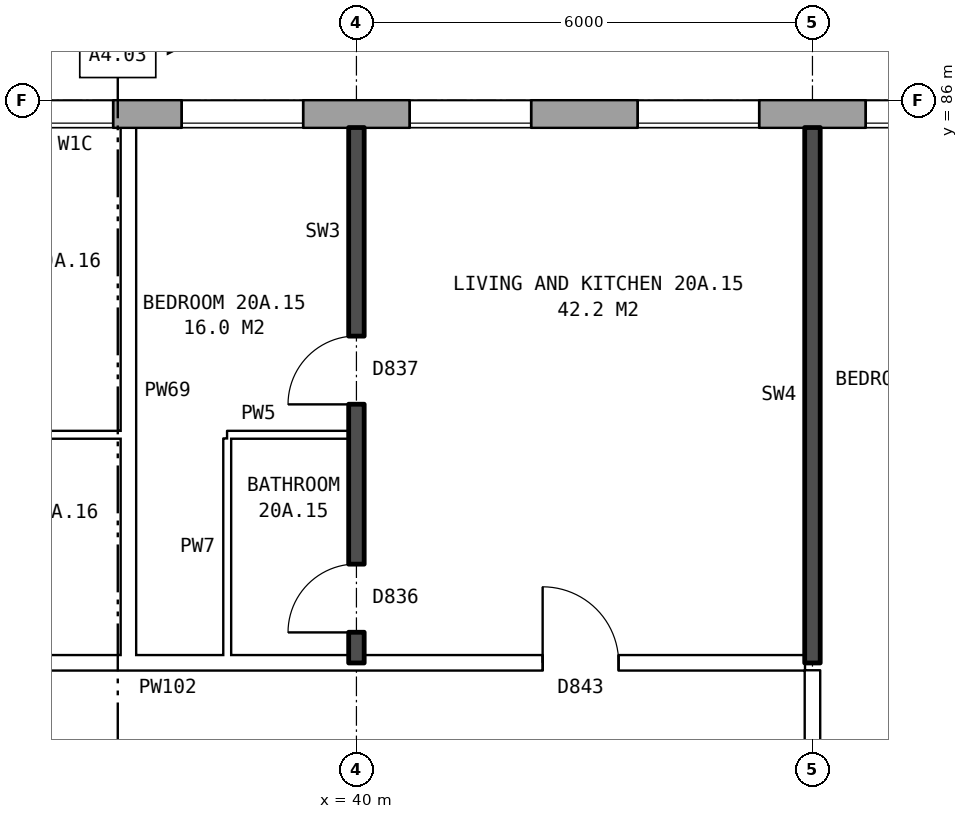
"""IFC4 building model, lengths in metres.
Left out: names, types, materials, properties, quantities, classifications, styles, units other than length and angle.
Written with IfcOpenShell. Run it as: python <this file> out.ifc"""

import sys

from ifc_helpers import new_model, si_unit, direction, frame, frame_2d, origin, place, context, subcontext, project, spatial, rectangle, extrude, element, fill, save


model = new_model("IFC4")
c1 = context("Model", 3, precision=1e-05, world=origin(), true_north=direction((0.0, 1.0)))
c2 = subcontext(c1, "Body", "Model", "MODEL_VIEW")
j1 = project(units=[si_unit("LENGTHUNIT", "METRE"), si_unit("PLANEANGLEUNIT", "RADIAN")], contexts=[c1])
p1 = place(None, origin())
s1 = spatial("IfcSite", under=j1, at=p1, CompositionType="ELEMENT")
p2 = place(p1, origin())
s2 = spatial("IfcBuilding", under=s1, at=p2, CompositionType="ELEMENT")
p3 = place(p2, frame((0.0, 0.0, 74.7)))
s3 = spatial("IfcBuildingStorey", under=s2, at=p3, CompositionType="ELEMENT", Elevation=74.7)
p4 = place(p3, frame((72.925, 85.82, 0.0), z_axis=(0.0, 0.0, 1.0), x_axis=(-1.0, 0.0, 0.0)))
e1 = element("IfcWall", 1, at=p4, inside=s3, PredefinedType="STANDARD", context=c2, shape_type="SweptSolid", body=[
    extrude(rectangle(XDim=46.601, YDim=0.36, at=frame_2d((23.3, 0.0))), origin(), (0.0, 0.0, 1.0), 2.85),
])
p5 = place(p4, frame((0.625, 0.0, 0.8)))
e2 = element("IfcOpeningElement", 2, at=p5, cuts=e1, PredefinedType="OPENING", context=c2, shape_type="SweptSolid", body=[
    extrude(rectangle(XDim=1.6, YDim=1.8, at=frame_2d((0.8, 0.9))), frame((0.0, 0.19, 0.0), z_axis=(0.0, -1.0, 0.0), x_axis=(1.0, 0.0, 0.0)), (0.0, 0.0, 1.0), 0.38),
])
p6 = place(p4, frame((3.625, 0.0, 0.8)))
e3 = element("IfcOpeningElement", 3, at=p6, cuts=e1, PredefinedType="OPENING", context=c2, shape_type="SweptSolid", body=[
    extrude(rectangle(XDim=1.6, YDim=1.8, at=frame_2d((0.8, 0.9))), frame((0.0, 0.19, 0.0), z_axis=(0.0, -1.0, 0.0), x_axis=(1.0, 0.0, 0.0)), (0.0, 0.0, 1.0), 0.38),
])
p7 = place(p4, frame((5.525, 0.0, 1.7)))
e4 = element("IfcOpeningElement", 4, at=p7, cuts=e1, PredefinedType="OPENING", context=c2, shape_type="SweptSolid", body=[
    extrude(rectangle(XDim=1.4, YDim=0.9, at=frame_2d((0.7, 0.45))), frame((0.0, 0.19, 0.0), z_axis=(0.0, -1.0, 0.0), x_axis=(1.0, 0.0, 0.0)), (0.0, 0.0, 1.0), 0.38),
])
p8 = place(p4, frame((9.625, 0.0, 0.8)))
e5 = element("IfcOpeningElement", 5, at=p8, cuts=e1, PredefinedType="OPENING", context=c2, shape_type="SweptSolid", body=[
    extrude(rectangle(XDim=1.6, YDim=1.8, at=frame_2d((0.8, 0.9))), frame((0.0, 0.19, 0.0), z_axis=(0.0, -1.0, 0.0), x_axis=(1.0, 0.0, 0.0)), (0.0, 0.0, 1.0), 0.38),
])
p9 = place(p4, frame((12.625, 0.0, 0.8)))
e6 = element("IfcOpeningElement", 6, at=p9, cuts=e1, PredefinedType="OPENING", context=c2, shape_type="SweptSolid", body=[
    extrude(rectangle(XDim=1.6, YDim=1.8, at=frame_2d((0.8, 0.9))), frame((0.0, 0.19, 0.0), z_axis=(0.0, -1.0, 0.0), x_axis=(1.0, 0.0, 0.0)), (0.0, 0.0, 1.0), 0.38),
])
p10 = place(p4, frame((15.625, 0.0, 0.8)))
e7 = element("IfcOpeningElement", 7, at=p10, cuts=e1, PredefinedType="OPENING", context=c2, shape_type="SweptSolid", body=[
    extrude(rectangle(XDim=1.6, YDim=1.8, at=frame_2d((0.8, 0.9))), frame((0.0, 0.19, 0.0), z_axis=(0.0, -1.0, 0.0), x_axis=(1.0, 0.0, 0.0)), (0.0, 0.0, 1.0), 0.38),
])
p11 = place(p4, frame((18.625, 0.0, 0.8)))
e8 = element("IfcOpeningElement", 8, at=p11, cuts=e1, PredefinedType="OPENING", context=c2, shape_type="SweptSolid", body=[
    extrude(rectangle(XDim=1.6, YDim=1.8, at=frame_2d((0.8, 0.9))), frame((0.0, 0.19, 0.0), z_axis=(0.0, -1.0, 0.0), x_axis=(1.0, 0.0, 0.0)), (0.0, 0.0, 1.0), 0.38),
])
p12 = place(p4, frame((21.625, 0.0, 0.8)))
e9 = element("IfcOpeningElement", 9, at=p12, cuts=e1, PredefinedType="OPENING", context=c2, shape_type="SweptSolid", body=[
    extrude(rectangle(XDim=1.6, YDim=1.8, at=frame_2d((0.8, 0.9))), frame((0.0, 0.19, 0.0), z_axis=(0.0, -1.0, 0.0), x_axis=(1.0, 0.0, 0.0)), (0.0, 0.0, 1.0), 0.38),
])
p13 = place(p4, frame((24.625, 0.0, 0.8)))
e10 = element("IfcOpeningElement", 10, at=p13, cuts=e1, PredefinedType="OPENING", context=c2, shape_type="SweptSolid", body=[
    extrude(rectangle(XDim=1.6, YDim=1.8, at=frame_2d((0.8, 0.9))), frame((0.0, 0.19, 0.0), z_axis=(0.0, -1.0, 0.0), x_axis=(1.0, 0.0, 0.0)), (0.0, 0.0, 1.0), 0.38),
])
p14 = place(p4, frame((27.625, 0.0, 0.8)))
e11 = element("IfcOpeningElement", 11, at=p14, cuts=e1, PredefinedType="OPENING", context=c2, shape_type="SweptSolid", body=[
    extrude(rectangle(XDim=1.6, YDim=1.8, at=frame_2d((0.8, 0.9))), frame((0.0, 0.19, 0.0), z_axis=(0.0, -1.0, 0.0), x_axis=(1.0, 0.0, 0.0)), (0.0, 0.0, 1.0), 0.38),
])
p15 = place(p4, frame((30.625, 0.0, 0.8)))
e12 = element("IfcOpeningElement", 12, at=p15, cuts=e1, PredefinedType="OPENING", context=c2, shape_type="SweptSolid", body=[
    extrude(rectangle(XDim=1.6, YDim=1.8, at=frame_2d((0.8, 0.9))), frame((0.0, 0.19, 0.0), z_axis=(0.0, -1.0, 0.0), x_axis=(1.0, 0.0, 0.0)), (0.0, 0.0, 1.0), 0.38),
])
p16 = place(p4, frame((33.625, 0.0, 0.8)))
e13 = element("IfcOpeningElement", 13, at=p16, cuts=e1, PredefinedType="OPENING", context=c2, shape_type="SweptSolid", body=[
    extrude(rectangle(XDim=1.6, YDim=1.8, at=frame_2d((0.8, 0.9))), frame((0.0, 0.19, 0.0), z_axis=(0.0, -1.0, 0.0), x_axis=(1.0, 0.0, 0.0)), (0.0, 0.0, 1.0), 0.38),
])
p17 = place(p4, frame((36.125, 0.0, 0.8)))
e14 = element("IfcOpeningElement", 14, at=p17, cuts=e1, PredefinedType="OPENING", context=c2, shape_type="SweptSolid", body=[
    extrude(rectangle(XDim=1.0, YDim=1.8, at=frame_2d((0.5, 0.9))), frame((0.0, 0.19, 0.0), z_axis=(0.0, -1.0, 0.0), x_axis=(1.0, 0.0, 0.0)), (0.0, 0.0, 1.0), 0.38),
])
p18 = place(p4, frame((39.625, 0.0, 1.7)))
e15 = element("IfcOpeningElement", 15, at=p18, cuts=e1, PredefinedType="OPENING", context=c2, shape_type="SweptSolid", body=[
    extrude(rectangle(XDim=0.8, YDim=0.9, at=frame_2d((0.4, 0.45))), frame((0.0, 0.19, 0.0), z_axis=(0.0, -1.0, 0.0), x_axis=(1.0, 0.0, 0.0)), (0.0, 0.0, 1.0), 0.38),
])
p19 = place(p4, frame((42.625, 0.0, 0.8)))
e16 = element("IfcOpeningElement", 16, at=p19, cuts=e1, PredefinedType="OPENING", context=c2, shape_type="SweptSolid", body=[
    extrude(rectangle(XDim=1.6, YDim=1.8, at=frame_2d((0.8, 0.9))), frame((0.0, 0.19, 0.0), z_axis=(0.0, -1.0, 0.0), x_axis=(1.0, 0.0, 0.0)), (0.0, 0.0, 1.0), 0.38),
])
p20 = place(p4, frame((37.425, 0.0, 0.8)))
e17 = element("IfcOpeningElement", 17, at=p20, cuts=e1, PredefinedType="OPENING", context=c2, shape_type="SweptSolid", body=[
    extrude(rectangle(XDim=0.8, YDim=0.9, at=frame_2d((0.4, 0.45))), frame((0.0, 0.19, 0.0), z_axis=(0.0, -1.0, 0.0), x_axis=(1.0, 0.0, 0.0)), (0.0, 0.0, 1.0), 0.38),
])
p21 = place(p4, frame((40.725, 0.0, 0.8)))
e18 = element("IfcOpeningElement", 18, at=p21, cuts=e1, PredefinedType="OPENING", context=c2, shape_type="SweptSolid", body=[
    extrude(rectangle(XDim=1.6, YDim=1.8, at=frame_2d((0.8, 0.9))), frame((0.0, 0.19, 0.0), z_axis=(0.0, -1.0, 0.0), x_axis=(1.0, 0.0, 0.0)), (0.0, 0.0, 1.0), 0.38),
])
p22 = place(p3, frame((23.61, 78.6, 0.0), z_axis=(0.0, 0.0, 1.0), x_axis=(1.0, 0.0, 0.0)))
e19 = element("IfcWall", 19, at=p22, inside=s3, PredefinedType="PARTITIONING", context=c2, shape_type="SweptSolid", body=[
    extrude(rectangle(XDim=22.29, YDim=0.2, at=frame_2d((11.145, 0.0))), origin(), (0.0, 0.0, 1.0), 2.85),
])
p23 = place(p22, frame((18.84, 0.0, 0.0)))
e20 = element("IfcOpeningElement", 20, at=p23, cuts=e19, PredefinedType="OPENING", context=c2, shape_type="SweptSolid", body=[
    extrude(rectangle(XDim=1.0, YDim=2.1, at=frame_2d((0.5, 1.05))), frame((0.0, 0.11, 0.0), z_axis=(0.0, -1.0, 0.0), x_axis=(1.0, 0.0, 0.0)), (0.0, 0.0, 1.0), 0.22),
])
p24 = place(p22, frame((6.89, 0.0, 0.0)))
e21 = element("IfcOpeningElement", 21, at=p24, cuts=e19, PredefinedType="OPENING", context=c2, shape_type="SweptSolid", body=[
    extrude(rectangle(XDim=1.0, YDim=2.1, at=frame_2d((0.5, 1.05))), frame((0.0, 0.11, 0.0), z_axis=(0.0, -1.0, 0.0), x_axis=(1.0, 0.0, 0.0)), (0.0, 0.0, 1.0), 0.22),
])
p25 = place(p3, frame((34.1, 81.6, 0.0), z_axis=(0.0, 0.0, 1.0), x_axis=(1.0, 0.0, 0.0)))
e22 = element("IfcWall", 22, at=p25, inside=s3, PredefinedType="PARTITIONING", context=c2, shape_type="SweptSolid", body=[
    extrude(rectangle(XDim=2.8, YDim=0.1, at=frame_2d((1.4, 0.0))), origin(), (0.0, 0.0, 1.0), 2.85),
])
p26 = place(p3, frame((38.3, 81.6, 0.0), z_axis=(0.0, 0.0, 1.0), x_axis=(1.0, 0.0, 0.0)))
e23 = element("IfcWall", 23, at=p26, inside=s3, PredefinedType="PARTITIONING", context=c2, shape_type="SweptSolid", body=[
    extrude(rectangle(XDim=1.6, YDim=0.1, at=frame_2d((0.8, 0.0))), origin(), (0.0, 0.0, 1.0), 2.85),
])
p27 = place(p3, frame((37.0, 78.7, 0.0), z_axis=(0.0, 0.0, 1.0), x_axis=(0.0, 1.0, 0.0)))
e24 = element("IfcWall", 24, at=p27, inside=s3, PredefinedType="PARTITIONING", context=c2, shape_type="SweptSolid", body=[
    extrude(rectangle(XDim=6.94, YDim=0.2, at=frame_2d((3.47, 0.0))), origin(), (0.0, 0.0, 1.0), 2.85),
])
p28 = place(p3, frame((38.3, 78.7, 0.0), z_axis=(0.0, 0.0, 1.0), x_axis=(0.0, 1.0, 0.0)))
e25 = element("IfcWall", 25, at=p28, inside=s3, PredefinedType="PARTITIONING", context=c2, shape_type="SweptSolid", body=[
    extrude(rectangle(XDim=2.85, YDim=0.1, at=frame_2d((1.425, 0.0))), origin(), (0.0, 0.0, 1.0), 2.85),
])
p29 = place(p3, frame((40.0, 78.6, 0.0), z_axis=(0.0, 0.0, 1.0), x_axis=(0.0, 1.0, 0.0)))
e26 = element("IfcWall", 26, at=p29, inside=s3, PredefinedType="SOLIDWALL", context=c2, shape_type="SweptSolid", body=[
    extrude(rectangle(XDim=7.04, YDim=0.2, at=frame_2d((3.52, 0.0))), origin(), (0.0, 0.0, 1.0), 2.85),
])
p30 = place(p29, frame((3.4, 0.0, 0.0)))
e27 = element("IfcOpeningElement", 27, at=p30, cuts=e26, PredefinedType="OPENING", context=c2, shape_type="SweptSolid", body=[
    extrude(rectangle(XDim=0.9, YDim=2.1, at=frame_2d((0.45, 1.05))), frame((0.0, 0.11, 0.0), z_axis=(0.0, -1.0, 0.0), x_axis=(1.0, 0.0, 0.0)), (0.0, 0.0, 1.0), 0.22),
])
p31 = place(p29, frame((0.4, 0.0, 0.0)))
e28 = element("IfcOpeningElement", 28, at=p31, cuts=e26, PredefinedType="OPENING", context=c2, shape_type="SweptSolid", body=[
    extrude(rectangle(XDim=0.9, YDim=2.1, at=frame_2d((0.45, 1.05))), frame((0.0, 0.11, 0.0), z_axis=(0.0, -1.0, 0.0), x_axis=(1.0, 0.0, 0.0)), (0.0, 0.0, 1.0), 0.22),
])
p32 = place(p3, frame((46.0, 76.3, 0.0), z_axis=(0.0, 0.0, 1.0), x_axis=(0.0, 1.0, 0.0)))
e29 = element("IfcWall", 29, at=p32, inside=s3, PredefinedType="PARTITIONING", context=c2, shape_type="SweptSolid", body=[
    extrude(rectangle(XDim=2.2, YDim=0.2, at=frame_2d((1.1, 0.0))), origin(), (0.0, 0.0, 1.0), 2.85),
])
p33 = place(p3, frame((46.0, 78.6, 0.0), z_axis=(0.0, 0.0, 1.0), x_axis=(0.0, 1.0, 0.0)))
e30 = element("IfcWall", 30, at=p33, inside=s3, PredefinedType="SOLIDWALL", context=c2, shape_type="SweptSolid", body=[
    extrude(rectangle(XDim=7.04, YDim=0.2, at=frame_2d((3.52, 0.0))), origin(), (0.0, 0.0, 1.0), 2.85),
])
p34 = place(p13, origin())
e31 = element("IfcWindow", 31, at=p34, inside=s3, PartitioningType="SINGLE_PANEL", PredefinedType="WINDOW", context=c2, shape_type="SweptSolid", body=[
    extrude(rectangle(XDim=1.6, YDim=1.8, at=frame_2d((0.8, 0.9))), frame((0.0, 0.15, 0.0), z_axis=(0.0, -1.0, 0.0), x_axis=(1.0, 0.0, 0.0)), (0.0, 0.0, 1.0), 0.06),
])
fill(e10, e31)
p35 = place(p14, origin())
e32 = element("IfcWindow", 32, at=p35, inside=s3, PartitioningType="SINGLE_PANEL", PredefinedType="WINDOW", context=c2, shape_type="SweptSolid", body=[
    extrude(rectangle(XDim=1.6, YDim=1.8, at=frame_2d((0.8, 0.9))), frame((0.0, 0.15, 0.0), z_axis=(0.0, -1.0, 0.0), x_axis=(1.0, 0.0, 0.0)), (0.0, 0.0, 1.0), 0.06),
])
fill(e11, e32)
p36 = place(p15, origin())
e33 = element("IfcWindow", 33, at=p36, inside=s3, PartitioningType="SINGLE_PANEL", PredefinedType="WINDOW", context=c2, shape_type="SweptSolid", body=[
    extrude(rectangle(XDim=1.6, YDim=1.8, at=frame_2d((0.8, 0.9))), frame((0.0, 0.15, 0.0), z_axis=(0.0, -1.0, 0.0), x_axis=(1.0, 0.0, 0.0)), (0.0, 0.0, 1.0), 0.06),
])
fill(e12, e33)
p37 = place(p16, origin())
e34 = element("IfcWindow", 34, at=p37, inside=s3, PartitioningType="SINGLE_PANEL", PredefinedType="WINDOW", context=c2, shape_type="SweptSolid", body=[
    extrude(rectangle(XDim=1.6, YDim=1.8, at=frame_2d((0.8, 0.9))), frame((0.0, 0.15, 0.0), z_axis=(0.0, -1.0, 0.0), x_axis=(1.0, 0.0, 0.0)), (0.0, 0.0, 1.0), 0.06),
])
fill(e13, e34)
p38 = place(p17, origin())
e35 = element("IfcWindow", 35, at=p38, inside=s3, PartitioningType="SINGLE_PANEL", PredefinedType="WINDOW", context=c2, shape_type="SweptSolid", body=[
    extrude(rectangle(XDim=1.0, YDim=1.8, at=frame_2d((0.5, 0.9))), frame((0.0, 0.15, 0.0), z_axis=(0.0, -1.0, 0.0), x_axis=(1.0, 0.0, 0.0)), (0.0, 0.0, 1.0), 0.06),
])
fill(e14, e35)
p39 = place(p30, origin())
e36 = element("IfcDoor", 36, at=p39, inside=s3, OperationType="SINGLE_SWING_LEFT", PredefinedType="DOOR", context=c2, shape_type="SweptSolid", body=[
    extrude(rectangle(XDim=0.9, YDim=2.1, at=frame_2d((0.45, 1.05))), frame((0.0, 0.025, 0.0), z_axis=(0.0, -1.0, 0.0), x_axis=(1.0, 0.0, 0.0)), (0.0, 0.0, 1.0), 0.05),
])
fill(e27, e36)
p40 = place(p23, origin())
e37 = element("IfcDoor", 37, at=p40, inside=s3, OperationType="SINGLE_SWING_LEFT", PredefinedType="DOOR", context=c2, shape_type="SweptSolid", body=[
    extrude(rectangle(XDim=1.0, YDim=2.1, at=frame_2d((0.5, 1.05))), frame((0.0, 0.025, 0.0), z_axis=(0.0, -1.0, 0.0), x_axis=(1.0, 0.0, 0.0)), (0.0, 0.0, 1.0), 0.05),
])
fill(e20, e37)
p41 = place(p31, origin())
e38 = element("IfcDoor", 38, at=p41, inside=s3, OperationType="SINGLE_SWING_LEFT", PredefinedType="DOOR", context=c2, shape_type="SweptSolid", body=[
    extrude(rectangle(XDim=0.9, YDim=2.1, at=frame_2d((0.45, 1.05))), frame((0.0, 0.025, 0.0), z_axis=(0.0, -1.0, 0.0), x_axis=(1.0, 0.0, 0.0)), (0.0, 0.0, 1.0), 0.05),
])
fill(e28, e38)
save(model, sys.argv[1])
